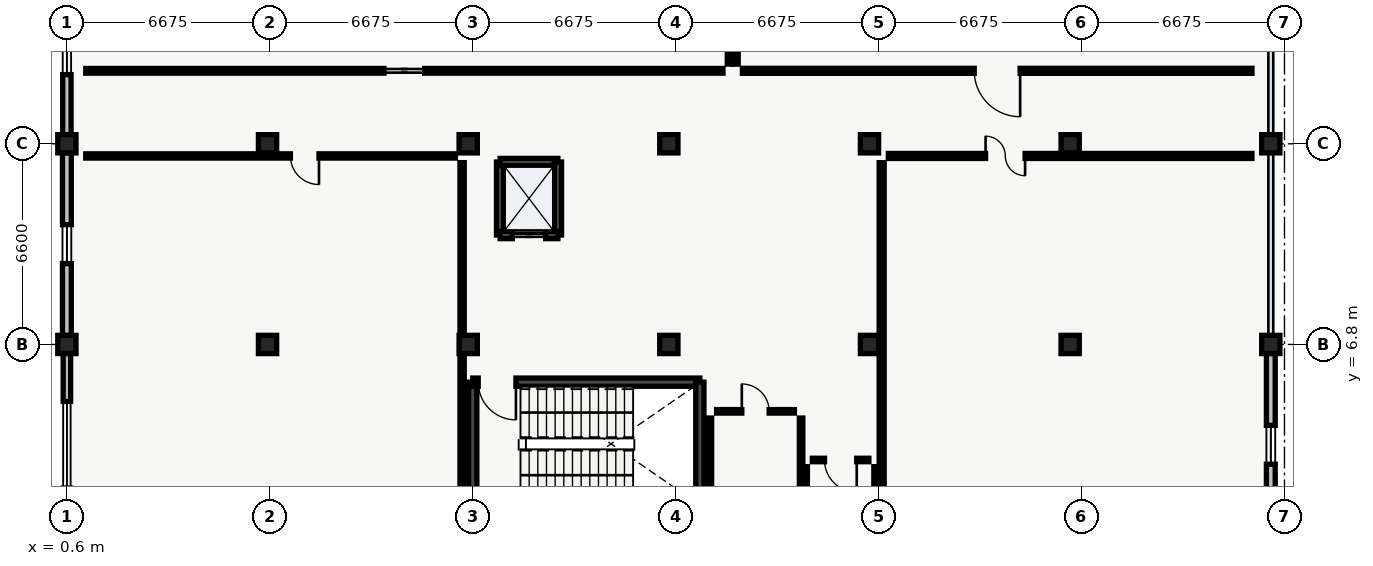
"""IFC4 building model, lengths in metres.
Left out: names, types, materials, properties, quantities, classifications, styles, units other than length and angle.
Written with IfcOpenShell. Run it as: python <this file> out.ifc"""

import sys

from ifc_helpers import new_model, si_unit, direction, frame, frame_2d, origin, origin_2d, place, context, subcontext, project, spatial, rectangle, extrude, element, fill, save


model = new_model("IFC4")
c1 = context("Model", 3, precision=1e-05, world=origin(), true_north=direction((0.0, 1.0)))
c2 = subcontext(c1, "Body", "Model", "MODEL_VIEW")
j1 = project(units=[si_unit("LENGTHUNIT", "METRE"), si_unit("PLANEANGLEUNIT", "RADIAN")], contexts=[c1])
p1 = place(None, origin())
s1 = spatial("IfcSite", under=j1, at=p1, CompositionType="ELEMENT")
p2 = place(p1, origin())
s2 = spatial("IfcBuilding", under=s1, at=p2, CompositionType="ELEMENT")
p3 = place(p2, frame((0.0, 0.0, 9.6)))
s3 = spatial("IfcBuildingStorey", under=s2, at=p3, CompositionType="ELEMENT", Elevation=9.6)
for number, where, z_axis, x_axis in (
    (1, (0.6, 6.8, 0.0), (0.0, 0.0, 1.0), (1.0, 0.0, 0.0)),
    (2, (0.6, 13.4, 0.0), (0.0, 0.0, 1.0), (1.0, 0.0, 0.0)),
    (3, (7.2, 6.8, 0.0), (0.0, 0.0, 1.0), (1.0, 0.0, 0.0)),
    (4, (7.2, 13.4, 0.0), (0.0, 0.0, 1.0), (1.0, 0.0, 0.0)),
    (5, (13.8, 6.8, 0.0), (0.0, 0.0, 1.0), (1.0, 0.0, 0.0)),
    (6, (13.8, 13.4, 0.0), (0.0, 0.0, 1.0), (1.0, 0.0, 0.0)),
    (7, (20.4, 6.8, 0.0), (0.0, 0.0, 1.0), (1.0, 0.0, 0.0)),
    (8, (20.4, 13.4, 0.0), (0.0, 0.0, 1.0), (1.0, 0.0, 0.0)),
    (9, (27.0, 6.8, 0.0), (0.0, 0.0, 1.0), (1.0, 0.0, 0.0)),
    (10, (27.0, 13.4, 0.0), (0.0, 0.0, 1.0), (1.0, 0.0, 0.0)),
    (11, (33.6, 6.8, 0.0), (0.0, 0.0, 1.0), (1.0, 0.0, 0.0)),
    (12, (33.6, 13.4, 0.0), (0.0, 0.0, 1.0), (1.0, 0.0, 0.0)),
    (13, (40.2, 6.8, 0.0), (0.0, 0.0, 1.0), (1.0, 0.0, 0.0)),
    (14, (40.2, 13.4, 0.0), (0.0, 0.0, 1.0), (1.0, 0.0, 0.0)),
):
    element("IfcColumn", number, at=place(p3, frame(where, z_axis=z_axis, x_axis=x_axis)), inside=s3, PredefinedType="COLUMN", context=c2, shape_type="SweptSolid", body=[
        extrude(rectangle(XDim=0.6, YDim=0.6, at=origin_2d()), origin(), (0.0, 0.0, 1.0), 4.28),
    ])
p4 = place(p3, frame((0.6, 0.495, 0.0), z_axis=(0.0, 0.0, 1.0), x_axis=(0.0, 1.0, 0.0)))
e15 = element("IfcWall", 15, at=p4, inside=s3, PredefinedType="STANDARD", context=c2, shape_type="SweptSolid", body=[
    extrude(rectangle(XDim=6.01, YDim=0.245, at=frame_2d((3.005, 0.0))), origin(), (0.0, 0.0, 1.0), 3.815),
])
p5 = place(p4, frame((1.58, 0.0, 0.95)))
e16 = element("IfcOpeningElement", 16, at=p5, cuts=e15, PredefinedType="OPENING", context=c2, shape_type="SweptSolid", body=[
    extrude(rectangle(XDim=2.85, YDim=1.5, at=frame_2d((1.425, 0.75))), frame((0.0, 0.123, 0.0), z_axis=(0.0, -1.0, 0.0), x_axis=(1.0, 0.0, 0.0)), (0.0, 0.0, 1.0), 0.245),
])
p6 = place(p3, frame((0.6, 7.095, 0.0), z_axis=(0.0, 0.0, 1.0), x_axis=(0.0, 1.0, 0.0)))
e17 = element("IfcWall", 17, at=p6, inside=s3, PredefinedType="STANDARD", context=c2, shape_type="SweptSolid", body=[
    extrude(rectangle(XDim=6.01, YDim=0.29, at=frame_2d((3.005, 0.0))), origin(), (0.0, 0.0, 1.0), 3.815),
])
p7 = place(p6, frame((2.365, 0.0, 0.95)))
e18 = element("IfcOpeningElement", 18, at=p7, cuts=e17, PredefinedType="OPENING", context=c2, shape_type="SweptSolid", body=[
    extrude(rectangle(XDim=1.28, YDim=1.42, at=frame_2d((0.64, 0.71))), frame((0.0, 0.145, 0.0), z_axis=(0.0, -1.0, 0.0), x_axis=(1.0, 0.0, 0.0)), (0.0, 0.0, 1.0), 0.29),
])
p8 = place(p3, frame((0.6, 13.695, 0.0), z_axis=(0.0, 0.0, 1.0), x_axis=(0.0, 1.0, 0.0)))
e19 = element("IfcWall", 19, at=p8, inside=s3, PredefinedType="STANDARD", context=c2, shape_type="SweptSolid", body=[
    extrude(rectangle(XDim=6.01, YDim=0.275, at=frame_2d((3.005, 0.0))), origin(), (0.0, 0.0, 1.0), 3.815),
])
p9 = place(p8, frame((1.98, 0.0, 0.95)))
e20 = element("IfcOpeningElement", 20, at=p9, cuts=e19, PredefinedType="OPENING", context=c2, shape_type="SweptSolid", body=[
    extrude(rectangle(XDim=2.05, YDim=1.7, at=frame_2d((1.025, 0.85))), frame((0.0, 0.137, 0.0), z_axis=(0.0, -1.0, 0.0), x_axis=(1.0, 0.0, 0.0)), (0.0, 0.0, 1.0), 0.275),
])
p10 = place(p3, frame((40.2, 6.505, 0.0), z_axis=(0.0, 0.0, 1.0), x_axis=(0.0, -1.0, 0.0)))
e21 = element("IfcWall", 21, at=p10, inside=s3, PredefinedType="STANDARD", context=c2, shape_type="SweptSolid", body=[
    extrude(rectangle(XDim=6.01, YDim=0.29, at=frame_2d((3.005, 0.0))), origin(), (0.0, 0.0, 1.0), 3.815),
])
p11 = place(p10, frame((2.365, 0.0, 0.95)))
e22 = element("IfcOpeningElement", 22, at=p11, cuts=e21, PredefinedType="OPENING", context=c2, shape_type="SweptSolid", body=[
    extrude(rectangle(XDim=1.28, YDim=1.42, at=frame_2d((0.64, 0.71))), frame((0.0, 0.145, 0.0), z_axis=(0.0, -1.0, 0.0), x_axis=(1.0, 0.0, 0.0)), (0.0, 0.0, 1.0), 0.29),
])
p12 = place(p3, frame((13.95, 1.5, 0.0), z_axis=(0.0, 0.0, 1.0), x_axis=(0.0, 1.0, 0.0)))
e23 = element("IfcWall", 23, at=p12, inside=s3, PredefinedType="SHEAR", context=c2, shape_type="SweptSolid", body=[
    extrude(rectangle(XDim=4.06, YDim=0.27, at=frame_2d((2.03, 0.0))), origin(), (0.0, 0.0, 1.0), 4.28),
])
p13 = place(p3, frame((13.95, 5.56, 0.0), z_axis=(0.0, 0.0, 1.0), x_axis=(1.0, 0.0, 0.0)))
e24 = element("IfcWall", 24, at=p13, inside=s3, PredefinedType="SHEAR", context=c2, shape_type="SweptSolid", body=[
    extrude(rectangle(XDim=7.47, YDim=0.27, at=frame_2d((3.735, 0.0))), origin(), (0.0, 0.0, 1.0), 4.28),
])
p14 = place(p13, frame((0.18, 0.0, 0.0)))
e25 = element("IfcOpeningElement", 25, at=p14, cuts=e24, PredefinedType="OPENING", context=c2, shape_type="SweptSolid", body=[
    extrude(rectangle(XDim=1.24, YDim=2.15, at=frame_2d((0.62, 1.075))), frame((0.0, 0.135, 0.0), z_axis=(0.0, -1.0, 0.0), x_axis=(1.0, 0.0, 0.0)), (0.0, 0.0, 1.0), 0.27),
])
p15 = place(p3, frame((21.42, 5.56, 0.0), z_axis=(0.0, 0.0, 1.0), x_axis=(0.0, -1.0, 0.0)))
e26 = element("IfcWall", 26, at=p15, inside=s3, PredefinedType="SHEAR", context=c2, shape_type="SweptSolid", body=[
    extrude(rectangle(XDim=4.06, YDim=0.27, at=frame_2d((2.03, 0.0))), origin(), (0.0, 0.0, 1.0), 4.28),
])
p16 = place(p3, frame((14.85, 10.4, 0.0), z_axis=(0.0, 0.0, 1.0), x_axis=(0.0, 1.0, 0.0)))
e27 = element("IfcWall", 27, at=p16, inside=s3, PredefinedType="SHEAR", context=c2, shape_type="SweptSolid", body=[
    extrude(rectangle(XDim=2.4, YDim=0.24, at=frame_2d((1.2, 0.0))), origin(), (0.0, 0.0, 1.0), 4.28),
])
p17 = place(p3, frame((14.85, 12.8, 0.0), z_axis=(0.0, 0.0, 1.0), x_axis=(1.0, 0.0, 0.0)))
e28 = element("IfcWall", 28, at=p17, inside=s3, PredefinedType="SHEAR", context=c2, shape_type="SweptSolid", body=[
    extrude(rectangle(XDim=1.9, YDim=0.24, at=frame_2d((0.95, 0.0))), origin(), (0.0, 0.0, 1.0), 4.28),
])
p18 = place(p3, frame((16.75, 12.8, 0.0), z_axis=(0.0, 0.0, 1.0), x_axis=(0.0, -1.0, 0.0)))
e29 = element("IfcWall", 29, at=p18, inside=s3, PredefinedType="SHEAR", context=c2, shape_type="SweptSolid", body=[
    extrude(rectangle(XDim=2.4, YDim=0.24, at=frame_2d((1.2, 0.0))), origin(), (0.0, 0.0, 1.0), 4.28),
])
p19 = place(p3, frame((16.75, 10.4, 0.0), z_axis=(0.0, 0.0, 1.0), x_axis=(-1.0, 0.0, 0.0)))
e30 = element("IfcWall", 30, at=p19, inside=s3, PredefinedType="SHEAR", context=c2, shape_type="SweptSolid", body=[
    extrude(rectangle(XDim=1.9, YDim=0.24, at=frame_2d((0.95, 0.0))), origin(), (0.0, 0.0, 1.0), 4.28),
])
p20 = place(p19, frame((0.4, 0.0, 0.0)))
e31 = element("IfcOpeningElement", 31, at=p20, cuts=e30, PredefinedType="OPENING", context=c2, shape_type="SweptSolid", body=[
    extrude(rectangle(XDim=1.1, YDim=2.2, at=frame_2d((0.55, 1.1))), frame((0.0, 0.12, 0.0), z_axis=(0.0, -1.0, 0.0), x_axis=(1.0, 0.0, 0.0)), (0.0, 0.0, 1.0), 0.24),
])
p21 = place(p3, frame((24.75, 0.82, 0.0), z_axis=(0.0, 0.0, 1.0), x_axis=(0.0, 1.0, 0.0)))
e32 = element("IfcWall", 32, at=p21, inside=s3, PredefinedType="PARTITIONING", context=c2, shape_type="SweptSolid", body=[
    extrude(rectangle(XDim=3.56, YDim=0.115, at=frame_2d((1.78, 0.0))), origin(), (0.0, 0.0, 1.0), 3.95),
])
p22 = place(p3, frame((24.53, 4.6, 0.0), z_axis=(0.0, 0.0, 1.0), x_axis=(-1.0, 0.0, 0.0)))
e33 = element("IfcWall", 33, at=p22, inside=s3, PredefinedType="PARTITIONING", context=c2, shape_type="SweptSolid", body=[
    extrude(rectangle(XDim=2.56, YDim=0.115, at=frame_2d((1.28, 0.0))), origin(), (0.0, 0.0, 1.0), 3.95),
])
p23 = place(p22, frame((0.83, 0.0, 0.0)))
e34 = element("IfcOpeningElement", 34, at=p23, cuts=e33, PredefinedType="OPENING", context=c2, shape_type="SweptSolid", body=[
    extrude(rectangle(XDim=0.9, YDim=2.1, at=frame_2d((0.45, 1.05))), frame((0.0, 0.058, 0.0), z_axis=(0.0, -1.0, 0.0), x_axis=(1.0, 0.0, 0.0)), (0.0, 0.0, 1.0), 0.115),
])
p24 = place(p3, frame((21.75, 4.38, 0.0), z_axis=(0.0, 0.0, 1.0), x_axis=(0.0, -1.0, 0.0)))
e35 = element("IfcWall", 35, at=p24, inside=s3, PredefinedType="PARTITIONING", context=c2, shape_type="SweptSolid", body=[
    extrude(rectangle(XDim=3.56, YDim=0.115, at=frame_2d((1.78, 0.0))), origin(), (0.0, 0.0, 1.0), 3.95),
])
p25 = place(p3, frame((27.2, 0.82, 0.0), z_axis=(0.0, 0.0, 1.0), x_axis=(0.0, 1.0, 0.0)))
e36 = element("IfcWall", 36, at=p25, inside=s3, PredefinedType="PARTITIONING", context=c2, shape_type="SweptSolid", body=[
    extrude(rectangle(XDim=1.96, YDim=0.115, at=frame_2d((0.98, 0.0))), origin(), (0.0, 0.0, 1.0), 3.615),
])
p26 = place(p3, frame((26.98, 3.0, 0.0), z_axis=(0.0, 0.0, 1.0), x_axis=(-1.0, 0.0, 0.0)))
e37 = element("IfcWall", 37, at=p26, inside=s3, PredefinedType="PARTITIONING", context=c2, shape_type="SweptSolid", body=[
    extrude(rectangle(XDim=1.86, YDim=0.115, at=frame_2d((0.93, 0.0))), origin(), (0.0, 0.0, 1.0), 3.95),
])
p27 = place(p26, frame((0.4, 0.0, 0.0)))
e38 = element("IfcOpeningElement", 38, at=p27, cuts=e37, PredefinedType="OPENING", context=c2, shape_type="SweptSolid", body=[
    extrude(rectangle(XDim=1.06, YDim=2.12, at=frame_2d((0.53, 1.06))), frame((0.0, 0.058, 0.0), z_axis=(0.0, -1.0, 0.0), x_axis=(1.0, 0.0, 0.0)), (0.0, 0.0, 1.0), 0.115),
])
p28 = place(p3, frame((24.9, 2.78, 0.0), z_axis=(0.0, 0.0, 1.0), x_axis=(0.0, -1.0, 0.0)))
e39 = element("IfcWall", 39, at=p28, inside=s3, PredefinedType="PARTITIONING", context=c2, shape_type="SweptSolid", body=[
    extrude(rectangle(XDim=1.96, YDim=0.115, at=frame_2d((0.98, 0.0))), origin(), (0.0, 0.0, 1.0), 3.95),
])
p29 = place(p3, frame((1.22, 15.8, 0.0), z_axis=(0.0, 0.0, 1.0), x_axis=(1.0, 0.0, 0.0)))
e40 = element("IfcWall", 40, at=p29, inside=s3, PredefinedType="PARTITIONING", context=c2, shape_type="SweptSolid", body=[
    extrude(rectangle(XDim=20.96, YDim=0.155, at=frame_2d((10.48, 0.0))), origin(), (0.0, 0.0, 1.0), 3.815),
])
p30 = place(p29, frame((9.81, 0.0, 0.0)))
e41 = element("IfcOpeningElement", 41, at=p30, cuts=e40, PredefinedType="OPENING", context=c2, shape_type="SweptSolid", body=[
    extrude(rectangle(XDim=1.34, YDim=2.2, at=frame_2d((0.67, 1.1))), frame((0.0, 0.078, 0.0), z_axis=(0.0, -1.0, 0.0), x_axis=(1.0, 0.0, 0.0)), (0.0, 0.0, 1.0), 0.155),
])
p31 = place(p3, frame((22.4, 16.02, 0.0), z_axis=(0.0, 0.0, 1.0), x_axis=(0.0, 1.0, 0.0)))
e42 = element("IfcWall", 42, at=p31, inside=s3, PredefinedType="PARTITIONING", context=c2, shape_type="SweptSolid", body=[
    extrude(rectangle(XDim=9.96, YDim=0.155, at=frame_2d((4.98, 0.0))), origin(), (0.0, 0.0, 1.0), 3.95),
])
p32 = place(p3, frame((22.82, 15.8, 0.0), z_axis=(0.0, 0.0, 1.0), x_axis=(1.0, 0.0, 0.0)))
e43 = element("IfcWall", 43, at=p32, inside=s3, PredefinedType="PARTITIONING", context=c2, shape_type="SweptSolid", body=[
    extrude(rectangle(XDim=16.76, YDim=0.165, at=frame_2d((8.38, 0.0))), origin(), (0.0, 0.0, 1.0), 3.815),
])
p33 = place(p32, frame((7.625, 0.0, 0.0)))
e44 = element("IfcOpeningElement", 44, at=p33, cuts=e43, PredefinedType="OPENING", context=c2, shape_type="SweptSolid", body=[
    extrude(rectangle(XDim=1.51, YDim=2.12, at=frame_2d((0.755, 1.06))), frame((0.0, 0.083, 0.0), z_axis=(0.0, -1.0, 0.0), x_axis=(1.0, 0.0, 0.0)), (0.0, 0.0, 1.0), 0.165),
])
p34 = place(p3, frame((22.6, 25.98, 0.0), z_axis=(0.0, 0.0, 1.0), x_axis=(0.0, -1.0, 0.0)))
e45 = element("IfcWall", 45, at=p34, inside=s3, PredefinedType="PARTITIONING", context=c2, shape_type="SweptSolid", body=[
    extrude(rectangle(XDim=9.96, YDim=0.165, at=frame_2d((4.98, 0.0))), origin(), (0.0, 0.0, 1.0), 3.95),
])
p35 = place(p3, frame((13.6, 0.82, 0.0), z_axis=(0.0, 0.0, 1.0), x_axis=(0.0, 1.0, 0.0)))
e46 = element("IfcWall", 46, at=p35, inside=s3, PredefinedType="PARTITIONING", context=c2, shape_type="SweptSolid", body=[
    extrude(rectangle(XDim=11.96, YDim=0.14, at=frame_2d((5.98, 0.0))), origin(), (0.0, 0.0, 1.0), 3.615),
])
p36 = place(p3, frame((13.38, 13.0, 0.0), z_axis=(0.0, 0.0, 1.0), x_axis=(-1.0, 0.0, 0.0)))
e47 = element("IfcWall", 47, at=p36, inside=s3, PredefinedType="PARTITIONING", context=c2, shape_type="SweptSolid", body=[
    extrude(rectangle(XDim=12.16, YDim=0.14, at=frame_2d((6.08, 0.0))), origin(), (0.0, 0.0, 1.0), 3.95),
])
p37 = place(p36, frame((4.488, 0.0, 0.0)))
e48 = element("IfcOpeningElement", 48, at=p37, cuts=e47, PredefinedType="OPENING", context=c2, shape_type="SweptSolid", body=[
    extrude(rectangle(XDim=0.94, YDim=2.12, at=frame_2d((0.47, 1.06))), frame((0.0, 0.07, 0.0), z_axis=(0.0, -1.0, 0.0), x_axis=(1.0, 0.0, 0.0)), (0.0, 0.0, 1.0), 0.14),
])
p38 = place(p3, frame((39.58, 13.0, 0.0), z_axis=(0.0, 0.0, 1.0), x_axis=(-1.0, 0.0, 0.0)))
e49 = element("IfcWall", 49, at=p38, inside=s3, PredefinedType="PARTITIONING", context=c2, shape_type="SweptSolid", body=[
    extrude(rectangle(XDim=11.96, YDim=0.165, at=frame_2d((5.98, 0.0))), origin(), (0.0, 0.0, 1.0), 3.95),
])
p39 = place(p38, frame((7.462, 0.0, 0.0)))
e50 = element("IfcOpeningElement", 50, at=p39, cuts=e49, PredefinedType="OPENING", context=c2, shape_type="SweptSolid", body=[
    extrude(rectangle(XDim=1.3, YDim=2.18, at=frame_2d((0.65, 1.09))), frame((0.0, 0.083, 0.0), z_axis=(0.0, -1.0, 0.0), x_axis=(1.0, 0.0, 0.0)), (0.0, 0.0, 1.0), 0.165),
])
p40 = place(p3, frame((27.4, 12.78, 0.0), z_axis=(0.0, 0.0, 1.0), x_axis=(0.0, -1.0, 0.0)))
e51 = element("IfcWall", 51, at=p40, inside=s3, PredefinedType="PARTITIONING", context=c2, shape_type="SweptSolid", body=[
    extrude(rectangle(XDim=11.96, YDim=0.165, at=frame_2d((5.98, 0.0))), origin(), (0.0, 0.0, 1.0), 3.95),
])
p41 = place(p5, origin())
e52 = element("IfcWindow", 52, at=p41, inside=s3, PartitioningType="SINGLE_PANEL", PredefinedType="WINDOW", context=c2, shape_type="SweptSolid", body=[
    extrude(rectangle(XDim=2.85, YDim=1.5, at=frame_2d((1.425, 0.75))), frame((0.0, 0.03, 0.0), z_axis=(0.0, -1.0, 0.0), x_axis=(1.0, 0.0, 0.0)), (0.0, 0.0, 1.0), 0.06),
])
fill(e16, e52)
p42 = place(p7, origin())
e53 = element("IfcWindow", 53, at=p42, inside=s3, PartitioningType="SINGLE_PANEL", PredefinedType="WINDOW", context=c2, shape_type="SweptSolid", body=[
    extrude(rectangle(XDim=1.28, YDim=1.42, at=frame_2d((0.64, 0.71))), frame((0.0, 0.03, 0.0), z_axis=(0.0, -1.0, 0.0), x_axis=(1.0, 0.0, 0.0)), (0.0, 0.0, 1.0), 0.06),
])
fill(e18, e53)
p43 = place(p9, origin())
e54 = element("IfcWindow", 54, at=p43, inside=s3, PartitioningType="SINGLE_PANEL", PredefinedType="WINDOW", context=c2, shape_type="SweptSolid", body=[
    extrude(rectangle(XDim=2.05, YDim=1.7, at=frame_2d((1.025, 0.85))), frame((0.0, 0.03, 0.0), z_axis=(0.0, -1.0, 0.0), x_axis=(1.0, 0.0, 0.0)), (0.0, 0.0, 1.0), 0.06),
])
fill(e20, e54)
p44 = place(p11, origin())
e55 = element("IfcWindow", 55, at=p44, inside=s3, PartitioningType="SINGLE_PANEL", PredefinedType="WINDOW", context=c2, shape_type="SweptSolid", body=[
    extrude(rectangle(XDim=1.28, YDim=1.42, at=frame_2d((0.64, 0.71))), frame((0.0, 0.03, 0.0), z_axis=(0.0, -1.0, 0.0), x_axis=(1.0, 0.0, 0.0)), (0.0, 0.0, 1.0), 0.06),
])
fill(e22, e55)
p45 = place(p14, origin())
e56 = element("IfcDoor", 56, at=p45, inside=s3, OperationType="SINGLE_SWING_RIGHT", PredefinedType="DOOR", context=c2, shape_type="SweptSolid", body=[
    extrude(rectangle(XDim=1.24, YDim=2.15, at=frame_2d((0.62, 1.075))), frame((0.0, 0.025, 0.0), z_axis=(0.0, -1.0, 0.0), x_axis=(1.0, 0.0, 0.0)), (0.0, 0.0, 1.0), 0.05),
])
fill(e25, e56)
p46 = place(p20, origin())
e57 = element("IfcDoor", 57, at=p46, inside=s3, OperationType="SLIDING_TO_LEFT", PredefinedType="DOOR", context=c2, shape_type="SweptSolid", body=[
    extrude(rectangle(XDim=1.1, YDim=2.2, at=frame_2d((0.55, 1.1))), frame((0.0, 0.025, 0.0), z_axis=(0.0, -1.0, 0.0), x_axis=(1.0, 0.0, 0.0)), (0.0, 0.0, 1.0), 0.05),
])
fill(e31, e57)
p47 = place(p23, origin())
e58 = element("IfcDoor", 58, at=p47, inside=s3, OperationType="SINGLE_SWING_RIGHT", PredefinedType="DOOR", context=c2, shape_type="SweptSolid", body=[
    extrude(rectangle(XDim=0.9, YDim=2.1, at=frame_2d((0.45, 1.05))), frame((0.0, 0.025, 0.0), z_axis=(0.0, -1.0, 0.0), x_axis=(1.0, 0.0, 0.0)), (0.0, 0.0, 1.0), 0.05),
])
fill(e34, e58)
p48 = place(p27, origin())
e59 = element("IfcDoor", 59, at=p48, inside=s3, OperationType="SINGLE_SWING_LEFT", PredefinedType="DOOR", context=c2, shape_type="SweptSolid", body=[
    extrude(rectangle(XDim=1.06, YDim=2.12, at=frame_2d((0.53, 1.06))), frame((0.0, 0.025, 0.0), z_axis=(0.0, -1.0, 0.0), x_axis=(1.0, 0.0, 0.0)), (0.0, 0.0, 1.0), 0.05),
])
fill(e38, e59)
p49 = place(p30, origin())
e60 = element("IfcDoor", 60, at=p49, inside=s3, OperationType="SLIDING_TO_RIGHT", PredefinedType="DOOR", context=c2, shape_type="SweptSolid", body=[
    extrude(rectangle(XDim=1.34, YDim=2.2, at=frame_2d((0.67, 1.1))), frame((0.0, 0.025, 0.0), z_axis=(0.0, -1.0, 0.0), x_axis=(1.0, 0.0, 0.0)), (0.0, 0.0, 1.0), 0.05),
])
fill(e41, e60)
p50 = place(p33, origin())
e61 = element("IfcDoor", 61, at=p50, inside=s3, OperationType="SINGLE_SWING_RIGHT", PredefinedType="DOOR", context=c2, shape_type="SweptSolid", body=[
    extrude(rectangle(XDim=1.51, YDim=2.12, at=frame_2d((0.755, 1.06))), frame((0.0, 0.025, 0.0), z_axis=(0.0, -1.0, 0.0), x_axis=(1.0, 0.0, 0.0)), (0.0, 0.0, 1.0), 0.05),
])
fill(e44, e61)
p51 = place(p37, origin())
e62 = element("IfcDoor", 62, at=p51, inside=s3, OperationType="SINGLE_SWING_LEFT", PredefinedType="DOOR", context=c2, shape_type="SweptSolid", body=[
    extrude(rectangle(XDim=0.94, YDim=2.12, at=frame_2d((0.47, 1.06))), frame((0.0, 0.025, 0.0), z_axis=(0.0, -1.0, 0.0), x_axis=(1.0, 0.0, 0.0)), (0.0, 0.0, 1.0), 0.05),
])
fill(e48, e62)
p52 = place(p39, origin())
e63 = element("IfcDoor", 63, at=p52, inside=s3, OperationType="DOUBLE_DOOR_SINGLE_SWING", PredefinedType="DOOR", context=c2, shape_type="SweptSolid", body=[
    extrude(rectangle(XDim=1.3, YDim=2.18, at=frame_2d((0.65, 1.09))), frame((0.0, 0.025, 0.0), z_axis=(0.0, -1.0, 0.0), x_axis=(1.0, 0.0, 0.0)), (0.0, 0.0, 1.0), 0.05),
])
fill(e50, e63)
save(model, sys.argv[1])
